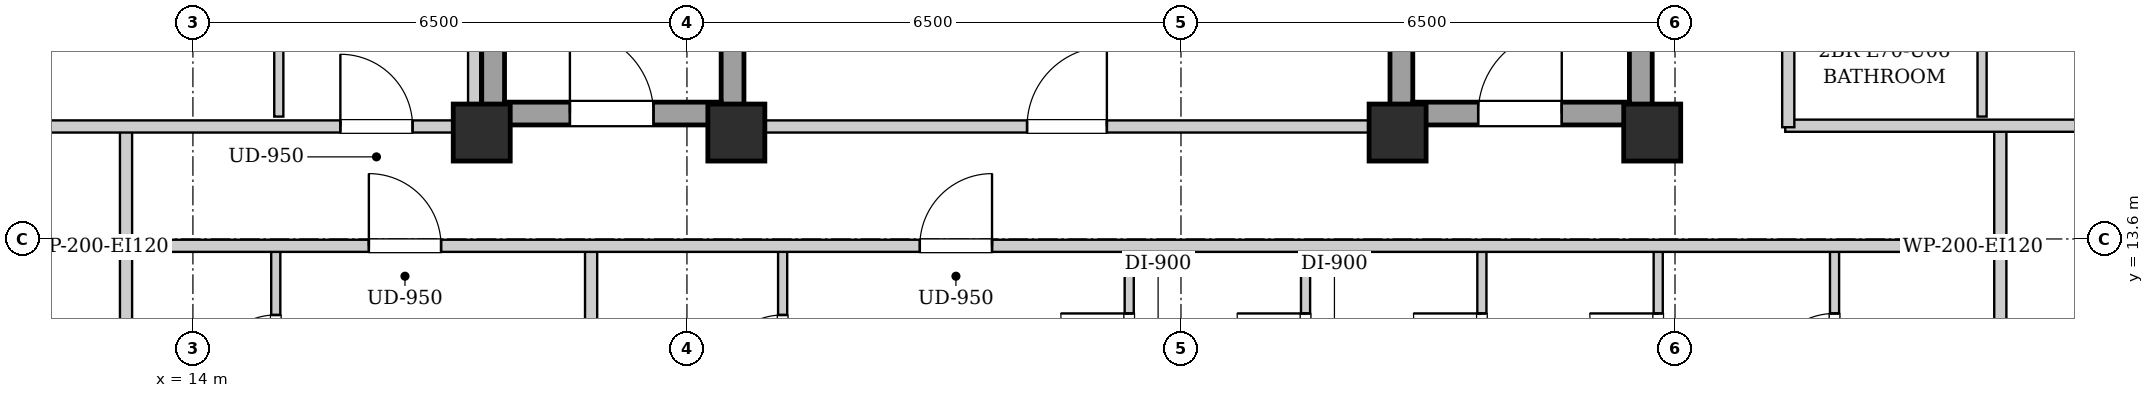
"""IFC4 building model, lengths in metres.
Left out: names, types, materials, properties, quantities, classifications, styles, units other than length and angle.
Written with IfcOpenShell. Run it as: python <this file> out.ifc"""

import sys

from ifc_helpers import new_model, si_unit, direction, frame, frame_2d, origin, origin_2d, place, context, subcontext, project, spatial, rectangle, extrude, element, fill, save


model = new_model("IFC4")
c1 = context("Model", 3, precision=1e-05, world=origin(), true_north=direction((0.0, 1.0)))
c2 = subcontext(c1, "Body", "Model", "MODEL_VIEW")
j1 = project(units=[si_unit("LENGTHUNIT", "METRE"), si_unit("PLANEANGLEUNIT", "RADIAN")], contexts=[c1])
p1 = place(None, origin())
s1 = spatial("IfcSite", under=j1, at=p1, CompositionType="ELEMENT")
p2 = place(p1, origin())
s2 = spatial("IfcBuilding", under=s1, at=p2, CompositionType="ELEMENT")
p3 = place(p2, frame((0.0, 0.0, 241.1)))
s3 = spatial("IfcBuildingStorey", under=s2, at=p3, CompositionType="ELEMENT", Elevation=241.1)
for number, where, z_axis, x_axis in (
    (1, (17.8, 15.0, 0.0), (0.0, 0.0, 1.0), (1.0, 0.0, 0.0)),
    (2, (21.15, 15.0, 0.0), (0.0, 0.0, 1.0), (1.0, 0.0, 0.0)),
    (3, (29.85, 15.0, 0.0), (0.0, 0.0, 1.0), (1.0, 0.0, 0.0)),
    (4, (33.2, 15.0, 0.0), (0.0, 0.0, 1.0), (1.0, 0.0, 0.0)),
):
    element("IfcColumn", number, at=place(p3, frame(where, z_axis=z_axis, x_axis=x_axis)), inside=s3, PredefinedType="COLUMN", context=c2, shape_type="SweptSolid", body=[
        extrude(rectangle(XDim=0.75, YDim=0.75, at=origin_2d()), origin(), (0.0, 0.0, 1.0), 3.4),
    ])
for number, where, z_axis, x_axis in (
    (5, (17.95, 15.1, 0.0), (0.0, 0.0, 1.0), (0.0, 1.0, 0.0)),
    (6, (21.1, 15.1, 0.0), (0.0, 0.0, 1.0), (0.0, 1.0, 0.0)),
):
    element("IfcWall", number, at=place(p3, frame(where, z_axis=z_axis, x_axis=x_axis)), inside=s3, PredefinedType="SHEAR", context=c2, shape_type="SweptSolid", body=[
        extrude(rectangle(XDim=9.0, YDim=0.3, at=frame_2d((4.5, 0.0))), origin(), (0.0, 0.0, 1.0), 3.14),
    ])
p4 = place(p3, frame((18.1, 15.25, 0.0), z_axis=(0.0, 0.0, 1.0), x_axis=(1.0, 0.0, 0.0)))
e7 = element("IfcWall", 7, at=p4, inside=s3, PredefinedType="SHEAR", context=c2, shape_type="SweptSolid", body=[
    extrude(rectangle(XDim=2.85, YDim=0.3, at=frame_2d((1.425, 0.0))), origin(), (0.0, 0.0, 1.0), 3.14),
])
p5 = place(p4, frame((0.86, 0.0, 0.0)))
e8 = element("IfcOpeningElement", 8, at=p5, cuts=e7, PredefinedType="OPENING", context=c2, shape_type="SweptSolid", body=[
    extrude(rectangle(XDim=1.1, YDim=2.05, at=frame_2d((0.55, 1.025))), frame((0.0, 0.16, 0.0), z_axis=(0.0, -1.0, 0.0), x_axis=(1.0, 0.0, 0.0)), (0.0, 0.0, 1.0), 0.32),
])
for number, where, z_axis, x_axis in (
    (9, (29.9, 15.1, 0.0), (0.0, 0.0, 1.0), (0.0, 1.0, 0.0)),
    (10, (33.05, 15.1, 0.0), (0.0, 0.0, 1.0), (0.0, 1.0, 0.0)),
):
    element("IfcWall", number, at=place(p3, frame(where, z_axis=z_axis, x_axis=x_axis)), inside=s3, PredefinedType="SHEAR", context=c2, shape_type="SweptSolid", body=[
        extrude(rectangle(XDim=9.0, YDim=0.3, at=frame_2d((4.5, 0.0))), origin(), (0.0, 0.0, 1.0), 3.14),
    ])
p6 = place(p3, frame((30.05, 15.25, 0.0), z_axis=(0.0, 0.0, 1.0), x_axis=(1.0, 0.0, 0.0)))
e11 = element("IfcWall", 11, at=p6, inside=s3, PredefinedType="SHEAR", context=c2, shape_type="SweptSolid", body=[
    extrude(rectangle(XDim=2.85, YDim=0.3, at=frame_2d((1.425, 0.0))), origin(), (0.0, 0.0, 1.0), 3.14),
])
p7 = place(p6, frame((0.86, 0.0, 0.0)))
e12 = element("IfcOpeningElement", 12, at=p7, cuts=e11, PredefinedType="OPENING", context=c2, shape_type="SweptSolid", body=[
    extrude(rectangle(XDim=1.1, YDim=2.05, at=frame_2d((0.55, 1.025))), frame((0.0, 0.16, 0.0), z_axis=(0.0, -1.0, 0.0), x_axis=(1.0, 0.0, 0.0)), (0.0, 0.0, 1.0), 0.32),
])
p8 = place(p3, frame((21.25, 15.08, 0.0), z_axis=(0.0, 0.0, 1.0), x_axis=(1.0, 0.0, 0.0)))
e13 = element("IfcWall", 13, at=p8, inside=s3, PredefinedType="PARTITIONING", context=c2, shape_type="SweptSolid", body=[
    extrude(rectangle(XDim=8.5, YDim=0.16, at=frame_2d((4.25, 0.0))), origin(), (0.0, 0.0, 1.0), 2.668),
])
p9 = place(p8, frame((3.725, 0.0, 0.0)))
e14 = element("IfcOpeningElement", 14, at=p9, cuts=e13, PredefinedType="OPENING", context=c2, shape_type="SweptSolid", body=[
    extrude(rectangle(XDim=1.05, YDim=2.05, at=frame_2d((0.525, 1.025))), frame((0.0, 0.09, 0.0), z_axis=(0.0, -1.0, 0.0), x_axis=(1.0, 0.0, 0.0)), (0.0, 0.0, 1.0), 0.18),
])
for number, where, z_axis, x_axis in (
    (15, (13.12, 13.51, 0.0), (0.0, 0.0, 1.0), (0.0, 1.0, 0.0)),
    (16, (37.78, 13.51, 0.0), (0.0, 0.0, 1.0), (0.0, 1.0, 0.0)),
):
    element("IfcWall", number, at=place(p3, frame(where, z_axis=z_axis, x_axis=x_axis)), inside=s3, PredefinedType="PARTITIONING", context=c2, shape_type="SweptSolid", body=[
        extrude(rectangle(XDim=1.58, YDim=0.16, at=frame_2d((0.79, 0.0))), origin(), (0.0, 0.0, 1.0), 3.14),
    ])
p10 = place(p3, frame((34.95, 15.09, 0.0), z_axis=(0.0, 0.0, 1.0), x_axis=(1.0, 0.0, 0.0)))
e17 = element("IfcWall", 17, at=p10, inside=s3, PredefinedType="PARTITIONING", context=c2, shape_type="SweptSolid", body=[
    extrude(rectangle(XDim=5.07, YDim=0.16, at=frame_2d((2.535, 0.0))), origin(), (0.0, 0.0, 1.0), 2.668),
])
p11 = place(p3, frame((13.12, 10.81, 0.0), z_axis=(0.0, 0.0, 1.0), x_axis=(0.0, 1.0, 0.0)))
e18 = element("IfcWall", 18, at=p11, inside=s3, PredefinedType="PARTITIONING", context=c2, shape_type="SweptSolid", body=[
    extrude(rectangle(XDim=2.66, YDim=0.16, at=frame_2d((1.33, 0.0))), origin(), (0.0, 0.0, 1.0), 3.14),
])
p12 = place(p3, frame((15.09, 10.87, 0.0), z_axis=(0.0, 0.0, 1.0), x_axis=(0.0, 1.0, 0.0)))
e19 = element("IfcWall", 19, at=p12, inside=s3, PredefinedType="PARTITIONING", context=c2, shape_type="SweptSolid", body=[
    extrude(rectangle(XDim=2.6, YDim=0.12, at=frame_2d((1.3, 0.0))), origin(), (0.0, 0.0, 1.0), 3.14),
])
p13 = place(p12, frame((0.87, 0.0, 0.0)))
e20 = element("IfcOpeningElement", 20, at=p13, cuts=e19, PredefinedType="OPENING", context=c2, shape_type="SweptSolid", body=[
    extrude(rectangle(XDim=0.86, YDim=2.05, at=frame_2d((0.43, 1.025))), frame((0.0, 0.07, 0.0), z_axis=(0.0, -1.0, 0.0), x_axis=(1.0, 0.0, 0.0)), (0.0, 0.0, 1.0), 0.14),
])
p14 = place(p3, frame((37.78, 10.81, 0.0), z_axis=(0.0, 0.0, 1.0), x_axis=(0.0, 1.0, 0.0)))
e21 = element("IfcWall", 21, at=p14, inside=s3, PredefinedType="PARTITIONING", context=c2, shape_type="SweptSolid", body=[
    extrude(rectangle(XDim=2.66, YDim=0.16, at=frame_2d((1.33, 0.0))), origin(), (0.0, 0.0, 1.0), 3.14),
])
p15 = place(p3, frame((19.239, 6.06, 0.0), z_axis=(0.0, 0.0, 1.0), x_axis=(0.0, 1.0, 0.0)))
e22 = element("IfcWall", 22, at=p15, inside=s3, PredefinedType="PARTITIONING", context=c2, shape_type="SweptSolid", body=[
    extrude(rectangle(XDim=7.41, YDim=0.16, at=frame_2d((3.705, 0.0))), origin(), (0.0, 0.0, 1.0), 3.14),
])
p16 = place(p3, frame((21.759, 10.87, 0.0), z_axis=(0.0, 0.0, 1.0), x_axis=(0.0, 1.0, 0.0)))
e23 = element("IfcWall", 23, at=p16, inside=s3, PredefinedType="PARTITIONING", context=c2, shape_type="SweptSolid", body=[
    extrude(rectangle(XDim=2.6, YDim=0.12, at=frame_2d((1.3, 0.0))), origin(), (0.0, 0.0, 1.0), 3.14),
])
p17 = place(p16, frame((0.87, 0.0, 0.0)))
e24 = element("IfcOpeningElement", 24, at=p17, cuts=e23, PredefinedType="OPENING", context=c2, shape_type="SweptSolid", body=[
    extrude(rectangle(XDim=0.86, YDim=2.05, at=frame_2d((0.43, 1.025))), frame((0.0, 0.07, 0.0), z_axis=(0.0, -1.0, 0.0), x_axis=(1.0, 0.0, 0.0)), (0.0, 0.0, 1.0), 0.14),
])
p18 = place(p3, frame((26.319, 10.87, 0.0), z_axis=(0.0, 0.0, 1.0), x_axis=(0.0, 1.0, 0.0)))
e25 = element("IfcWall", 25, at=p18, inside=s3, PredefinedType="PARTITIONING", context=c2, shape_type="SweptSolid", body=[
    extrude(rectangle(XDim=2.6, YDim=0.12, at=frame_2d((1.3, 0.0))), origin(), (0.0, 0.0, 1.0), 3.14),
])
p19 = place(p18, frame((0.85, 0.0, 0.0)))
e26 = element("IfcOpeningElement", 26, at=p19, cuts=e25, PredefinedType="OPENING", context=c2, shape_type="SweptSolid", body=[
    extrude(rectangle(XDim=0.9, YDim=2.05, at=frame_2d((0.45, 1.025))), frame((0.0, 0.07, 0.0), z_axis=(0.0, -1.0, 0.0), x_axis=(1.0, 0.0, 0.0)), (0.0, 0.0, 1.0), 0.14),
])
p20 = place(p3, frame((28.639, 10.87, 0.0), z_axis=(0.0, 0.0, 1.0), x_axis=(0.0, 1.0, 0.0)))
e27 = element("IfcWall", 27, at=p20, inside=s3, PredefinedType="PARTITIONING", context=c2, shape_type="SweptSolid", body=[
    extrude(rectangle(XDim=2.6, YDim=0.12, at=frame_2d((1.3, 0.0))), origin(), (0.0, 0.0, 1.0), 3.14),
])
p21 = place(p20, frame((0.85, 0.0, 0.0)))
e28 = element("IfcOpeningElement", 28, at=p21, cuts=e27, PredefinedType="OPENING", context=c2, shape_type="SweptSolid", body=[
    extrude(rectangle(XDim=0.9, YDim=2.05, at=frame_2d((0.45, 1.025))), frame((0.0, 0.07, 0.0), z_axis=(0.0, -1.0, 0.0), x_axis=(1.0, 0.0, 0.0)), (0.0, 0.0, 1.0), 0.14),
])
p22 = place(p3, frame((30.959, 10.87, 0.0), z_axis=(0.0, 0.0, 1.0), x_axis=(0.0, 1.0, 0.0)))
e29 = element("IfcWall", 29, at=p22, inside=s3, PredefinedType="PARTITIONING", context=c2, shape_type="SweptSolid", body=[
    extrude(rectangle(XDim=2.6, YDim=0.12, at=frame_2d((1.3, 0.0))), origin(), (0.0, 0.0, 1.0), 3.14),
])
p23 = place(p22, frame((0.85, 0.0, 0.0)))
e30 = element("IfcOpeningElement", 30, at=p23, cuts=e29, PredefinedType="OPENING", context=c2, shape_type="SweptSolid", body=[
    extrude(rectangle(XDim=0.9, YDim=2.05, at=frame_2d((0.45, 1.025))), frame((0.0, 0.07, 0.0), z_axis=(0.0, -1.0, 0.0), x_axis=(1.0, 0.0, 0.0)), (0.0, 0.0, 1.0), 0.14),
])
p24 = place(p3, frame((33.279, 10.87, 0.0), z_axis=(0.0, 0.0, 1.0), x_axis=(0.0, 1.0, 0.0)))
e31 = element("IfcWall", 31, at=p24, inside=s3, PredefinedType="PARTITIONING", context=c2, shape_type="SweptSolid", body=[
    extrude(rectangle(XDim=2.6, YDim=0.12, at=frame_2d((1.3, 0.0))), origin(), (0.0, 0.0, 1.0), 2.668),
])
p25 = place(p24, frame((0.85, 0.0, 0.0)))
e32 = element("IfcOpeningElement", 32, at=p25, cuts=e31, PredefinedType="OPENING", context=c2, shape_type="SweptSolid", body=[
    extrude(rectangle(XDim=0.9, YDim=2.05, at=frame_2d((0.45, 1.025))), frame((0.0, 0.07, 0.0), z_axis=(0.0, -1.0, 0.0), x_axis=(1.0, 0.0, 0.0)), (0.0, 0.0, 1.0), 0.14),
])
p26 = place(p3, frame((35.599, 10.87, 0.0), z_axis=(0.0, 0.0, 1.0), x_axis=(0.0, 1.0, 0.0)))
e33 = element("IfcWall", 33, at=p26, inside=s3, PredefinedType="PARTITIONING", context=c2, shape_type="SweptSolid", body=[
    extrude(rectangle(XDim=2.6, YDim=0.12, at=frame_2d((1.3, 0.0))), origin(), (0.0, 0.0, 1.0), 3.14),
])
p27 = place(p26, frame((0.85, 0.0, 0.0)))
e34 = element("IfcOpeningElement", 34, at=p27, cuts=e33, PredefinedType="OPENING", context=c2, shape_type="SweptSolid", body=[
    extrude(rectangle(XDim=0.9, YDim=2.05, at=frame_2d((0.45, 1.025))), frame((0.0, 0.07, 0.0), z_axis=(0.0, -1.0, 0.0), x_axis=(1.0, 0.0, 0.0)), (0.0, 0.0, 1.0), 0.14),
])
p28 = place(p3, frame((10.88, 15.08, 0.0), z_axis=(0.0, 0.0, 1.0), x_axis=(1.0, 0.0, 0.0)))
e35 = element("IfcWall", 35, at=p28, inside=s3, PredefinedType="PARTITIONING", context=c2, shape_type="SweptSolid", body=[
    extrude(rectangle(XDim=6.88, YDim=0.16, at=frame_2d((3.44, 0.0))), origin(), (0.0, 0.0, 1.0), 2.668),
])
p29 = place(p28, frame((5.06, 0.0, 0.0)))
e36 = element("IfcOpeningElement", 36, at=p29, cuts=e35, PredefinedType="OPENING", context=c2, shape_type="SweptSolid", body=[
    extrude(rectangle(XDim=0.95, YDim=2.1, at=frame_2d((0.475, 1.05))), frame((0.0, 0.09, 0.0), z_axis=(0.0, -1.0, 0.0), x_axis=(1.0, 0.0, 0.0)), (0.0, 0.0, 1.0), 0.18),
])
p30 = place(p3, frame((15.13, 15.21, 0.0), z_axis=(0.0, 0.0, 1.0), x_axis=(0.0, 1.0, 0.0)))
e37 = element("IfcWall", 37, at=p30, inside=s3, PredefinedType="PARTITIONING", context=c2, shape_type="SweptSolid", body=[
    extrude(rectangle(XDim=3.946, YDim=0.12, at=frame_2d((1.973, 0.0))), origin(), (0.0, 0.0, 1.0), 3.14),
])
p31 = place(p30, frame((1.523, 0.0, 0.0)))
e38 = element("IfcOpeningElement", 38, at=p31, cuts=e37, PredefinedType="OPENING", context=c2, shape_type="SweptSolid", body=[
    extrude(rectangle(XDim=0.9, YDim=2.05, at=frame_2d((0.45, 1.025))), frame((0.0, 0.07, 0.0), z_axis=(0.0, -1.0, 0.0), x_axis=(1.0, 0.0, 0.0)), (0.0, 0.0, 1.0), 0.14),
])
p32 = place(p3, frame((37.54, 15.21, 0.0), z_axis=(0.0, 0.0, 1.0), x_axis=(0.0, 1.0, 0.0)))
e39 = element("IfcWall", 39, at=p32, inside=s3, PredefinedType="PARTITIONING", context=c2, shape_type="SweptSolid", body=[
    extrude(rectangle(XDim=2.3, YDim=0.12, at=frame_2d((1.15, 0.0))), origin(), (0.0, 0.0, 1.0), 3.14),
])
p33 = place(p3, frame((13.15, 13.51, 0.0), z_axis=(0.0, 0.0, 1.0), x_axis=(1.0, 0.0, 0.0)))
e40 = element("IfcWall", 40, at=p33, inside=s3, PredefinedType="PARTITIONING", context=c2, shape_type="SweptSolid", body=[
    extrude(rectangle(XDim=24.6, YDim=0.16, at=frame_2d((12.3, 0.0))), origin(), (0.0, 0.0, 1.0), 3.14),
])
p34 = place(p33, frame((3.165, 0.0, 0.0)))
e41 = element("IfcOpeningElement", 41, at=p34, cuts=e40, PredefinedType="OPENING", context=c2, shape_type="SweptSolid", body=[
    extrude(rectangle(XDim=0.95, YDim=2.1, at=frame_2d((0.475, 1.05))), frame((0.0, 0.09, 0.0), z_axis=(0.0, -1.0, 0.0), x_axis=(1.0, 0.0, 0.0)), (0.0, 0.0, 1.0), 0.18),
])
p35 = place(p33, frame((10.414, 0.0, 0.0)))
e42 = element("IfcOpeningElement", 42, at=p35, cuts=e40, PredefinedType="OPENING", context=c2, shape_type="SweptSolid", body=[
    extrude(rectangle(XDim=0.95, YDim=2.1, at=frame_2d((0.475, 1.05))), frame((0.0, 0.09, 0.0), z_axis=(0.0, -1.0, 0.0), x_axis=(1.0, 0.0, 0.0)), (0.0, 0.0, 1.0), 0.18),
])
p36 = place(p3, frame((17.7, 15.02, 0.0), z_axis=(0.0, 0.0, 1.0), x_axis=(0.0, 1.0, 0.0)))
e43 = element("IfcWall", 43, at=p36, inside=s3, PredefinedType="PARTITIONING", context=c2, shape_type="SweptSolid", body=[
    extrude(rectangle(XDim=13.98, YDim=0.16, at=frame_2d((6.99, 0.0))), origin(), (0.0, 0.0, 1.0), 3.14),
])
p37 = place(p3, frame((34.99, 15.07, 0.0), z_axis=(0.0, 0.0, 1.0), x_axis=(0.0, 1.0, 0.0)))
e44 = element("IfcWall", 44, at=p37, inside=s3, PredefinedType="PARTITIONING", context=c2, shape_type="SweptSolid", body=[
    extrude(rectangle(XDim=13.93, YDim=0.16, at=frame_2d((6.965, 0.0))), origin(), (0.0, 0.0, 1.0), 3.14),
])
p38 = place(p37, frame((4.385, 0.0, 0.0)))
e45 = element("IfcOpeningElement", 45, at=p38, cuts=e44, PredefinedType="OPENING", context=c2, shape_type="SweptSolid", body=[
    extrude(rectangle(XDim=0.95, YDim=2.1, at=frame_2d((0.475, 1.05))), frame((0.0, 0.09, 0.0), z_axis=(0.0, -1.0, 0.0), x_axis=(1.0, 0.0, 0.0)), (0.0, 0.0, 1.0), 0.18),
])
p39 = place(p5, origin())
e46 = element("IfcDoor", 46, at=p39, inside=s3, OperationType="SINGLE_SWING_LEFT", PredefinedType="DOOR", context=c2, shape_type="SweptSolid", body=[
    extrude(rectangle(XDim=1.1, YDim=2.05, at=frame_2d((0.55, 1.025))), frame((0.0, 0.025, 0.0), z_axis=(0.0, -1.0, 0.0), x_axis=(1.0, 0.0, 0.0)), (0.0, 0.0, 1.0), 0.05),
])
fill(e8, e46)
p40 = place(p7, origin())
e47 = element("IfcDoor", 47, at=p40, inside=s3, OperationType="SINGLE_SWING_RIGHT", PredefinedType="DOOR", context=c2, shape_type="SweptSolid", body=[
    extrude(rectangle(XDim=1.1, YDim=2.05, at=frame_2d((0.55, 1.025))), frame((0.0, 0.025, 0.0), z_axis=(0.0, -1.0, 0.0), x_axis=(1.0, 0.0, 0.0)), (0.0, 0.0, 1.0), 0.05),
])
fill(e12, e47)
p41 = place(p9, origin())
e48 = element("IfcDoor", 48, at=p41, inside=s3, OperationType="SINGLE_SWING_RIGHT", PredefinedType="DOOR", context=c2, shape_type="SweptSolid", body=[
    extrude(rectangle(XDim=1.05, YDim=2.05, at=frame_2d((0.525, 1.025))), frame((0.0, 0.025, 0.0), z_axis=(0.0, -1.0, 0.0), x_axis=(1.0, 0.0, 0.0)), (0.0, 0.0, 1.0), 0.05),
])
fill(e14, e48)
p42 = place(p13, origin())
e49 = element("IfcDoor", 49, at=p42, inside=s3, OperationType="SINGLE_SWING_LEFT", PredefinedType="DOOR", context=c2, shape_type="SweptSolid", body=[
    extrude(rectangle(XDim=0.86, YDim=2.05, at=frame_2d((0.43, 1.025))), frame((0.0, 0.025, 0.0), z_axis=(0.0, -1.0, 0.0), x_axis=(1.0, 0.0, 0.0)), (0.0, 0.0, 1.0), 0.05),
])
fill(e20, e49)
p43 = place(p17, origin())
e50 = element("IfcDoor", 50, at=p43, inside=s3, OperationType="SINGLE_SWING_LEFT", PredefinedType="DOOR", context=c2, shape_type="SweptSolid", body=[
    extrude(rectangle(XDim=0.86, YDim=2.05, at=frame_2d((0.43, 1.025))), frame((0.0, 0.025, 0.0), z_axis=(0.0, -1.0, 0.0), x_axis=(1.0, 0.0, 0.0)), (0.0, 0.0, 1.0), 0.05),
])
fill(e24, e50)
p44 = place(p19, origin())
e51 = element("IfcDoor", 51, at=p44, inside=s3, OperationType="SINGLE_SWING_RIGHT", PredefinedType="DOOR", context=c2, shape_type="SweptSolid", body=[
    extrude(rectangle(XDim=0.9, YDim=2.05, at=frame_2d((0.45, 1.025))), frame((0.0, 0.025, 0.0), z_axis=(0.0, -1.0, 0.0), x_axis=(1.0, 0.0, 0.0)), (0.0, 0.0, 1.0), 0.05),
])
fill(e26, e51)
p45 = place(p21, origin())
e52 = element("IfcDoor", 52, at=p45, inside=s3, OperationType="SINGLE_SWING_RIGHT", PredefinedType="DOOR", context=c2, shape_type="SweptSolid", body=[
    extrude(rectangle(XDim=0.9, YDim=2.05, at=frame_2d((0.45, 1.025))), frame((0.0, 0.025, 0.0), z_axis=(0.0, -1.0, 0.0), x_axis=(1.0, 0.0, 0.0)), (0.0, 0.0, 1.0), 0.05),
])
fill(e28, e52)
p46 = place(p23, origin())
e53 = element("IfcDoor", 53, at=p46, inside=s3, OperationType="SINGLE_SWING_RIGHT", PredefinedType="DOOR", context=c2, shape_type="SweptSolid", body=[
    extrude(rectangle(XDim=0.9, YDim=2.05, at=frame_2d((0.45, 1.025))), frame((0.0, 0.025, 0.0), z_axis=(0.0, -1.0, 0.0), x_axis=(1.0, 0.0, 0.0)), (0.0, 0.0, 1.0), 0.05),
])
fill(e30, e53)
p47 = place(p25, origin())
e54 = element("IfcDoor", 54, at=p47, inside=s3, OperationType="SINGLE_SWING_RIGHT", PredefinedType="DOOR", context=c2, shape_type="SweptSolid", body=[
    extrude(rectangle(XDim=0.9, YDim=2.05, at=frame_2d((0.45, 1.025))), frame((0.0, 0.025, 0.0), z_axis=(0.0, -1.0, 0.0), x_axis=(1.0, 0.0, 0.0)), (0.0, 0.0, 1.0), 0.05),
])
fill(e32, e54)
p48 = place(p27, origin())
e55 = element("IfcDoor", 55, at=p48, inside=s3, OperationType="SINGLE_SWING_LEFT", PredefinedType="DOOR", context=c2, shape_type="SweptSolid", body=[
    extrude(rectangle(XDim=0.9, YDim=2.05, at=frame_2d((0.45, 1.025))), frame((0.0, 0.025, 0.0), z_axis=(0.0, -1.0, 0.0), x_axis=(1.0, 0.0, 0.0)), (0.0, 0.0, 1.0), 0.05),
])
fill(e34, e55)
p49 = place(p29, origin())
e56 = element("IfcDoor", 56, at=p49, inside=s3, OperationType="SINGLE_SWING_LEFT", PredefinedType="DOOR", context=c2, shape_type="SweptSolid", body=[
    extrude(rectangle(XDim=0.95, YDim=2.1, at=frame_2d((0.475, 1.05))), frame((0.0, 0.025, 0.0), z_axis=(0.0, -1.0, 0.0), x_axis=(1.0, 0.0, 0.0)), (0.0, 0.0, 1.0), 0.05),
])
fill(e36, e56)
p50 = place(p34, origin())
e57 = element("IfcDoor", 57, at=p50, inside=s3, OperationType="SINGLE_SWING_LEFT", PredefinedType="DOOR", context=c2, shape_type="SweptSolid", body=[
    extrude(rectangle(XDim=0.95, YDim=2.1, at=frame_2d((0.475, 1.05))), frame((0.0, 0.025, 0.0), z_axis=(0.0, -1.0, 0.0), x_axis=(1.0, 0.0, 0.0)), (0.0, 0.0, 1.0), 0.05),
])
fill(e41, e57)
p51 = place(p35, origin())
e58 = element("IfcDoor", 58, at=p51, inside=s3, OperationType="SINGLE_SWING_RIGHT", PredefinedType="DOOR", context=c2, shape_type="SweptSolid", body=[
    extrude(rectangle(XDim=0.95, YDim=2.1, at=frame_2d((0.475, 1.05))), frame((0.0, 0.025, 0.0), z_axis=(0.0, -1.0, 0.0), x_axis=(1.0, 0.0, 0.0)), (0.0, 0.0, 1.0), 0.05),
])
fill(e42, e58)
save(model, sys.argv[1])
